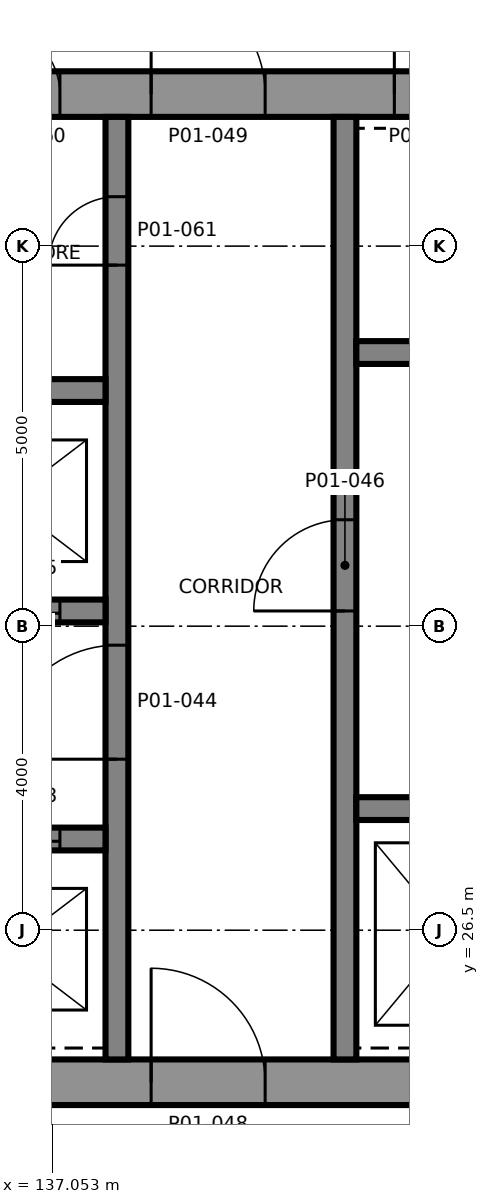
"""IFC4 building model, lengths in metres.
Left out: names, types, materials, properties, quantities, classifications, styles, units other than length and angle.
Written with IfcOpenShell. Run it as: python <this file> out.ifc"""

import sys

from ifc_helpers import new_model, si_unit, direction, frame, frame_2d, origin, place, context, subcontext, project, spatial, rectangle, extrude, element, fill, save


model = new_model("IFC4")
c1 = context("Model", 3, precision=1e-05, world=origin(), true_north=direction((0.0, 1.0)))
c2 = subcontext(c1, "Body", "Model", "MODEL_VIEW")
j1 = project(units=[si_unit("LENGTHUNIT", "METRE"), si_unit("PLANEANGLEUNIT", "RADIAN")], contexts=[c1])
p1 = place(None, origin())
s1 = spatial("IfcSite", under=j1, at=p1, CompositionType="ELEMENT")
p2 = place(p1, origin())
s2 = spatial("IfcBuilding", under=s1, at=p2, CompositionType="ELEMENT")
p3 = place(p2, frame((0.0, 0.0, 8.0)))
s3 = spatial("IfcBuildingStorey", under=s2, at=p3, CompositionType="ELEMENT", Elevation=8.0)
p4 = place(p3, frame((128.7, 24.5, 0.0), z_axis=(0.0, 0.0, 1.0), x_axis=(1.0, 0.0, 0.0)))
e1 = element("IfcWall", 1, at=p4, inside=s3, PredefinedType="SHEAR", context=c2, shape_type="SweptSolid", body=[
    extrude(rectangle(XDim=15.0, YDim=0.6, at=frame_2d((7.5, 0.0))), origin(), (0.0, 0.0, 1.0), 5.5),
])
p5 = place(p4, frame((9.65, 0.0, 0.0)))
e2 = element("IfcOpeningElement", 2, at=p5, cuts=e1, PredefinedType="OPENING", context=c2, shape_type="SweptSolid", body=[
    extrude(rectangle(XDim=1.5, YDim=2.1, at=frame_2d((0.75, 1.05))), frame((0.0, 0.31, 0.0), z_axis=(0.0, -1.0, 0.0), x_axis=(1.0, 0.0, 0.0)), (0.0, 0.0, 1.0), 0.62),
])
p6 = place(p4, frame((1.25, 0.0, 0.0)))
e3 = element("IfcOpeningElement", 3, at=p6, cuts=e1, PredefinedType="OPENING", context=c2, shape_type="SweptSolid", body=[
    extrude(rectangle(XDim=0.9, YDim=2.1, at=frame_2d((0.45, 1.05))), frame((0.0, 0.31, 0.0), z_axis=(0.0, -1.0, 0.0), x_axis=(1.0, 0.0, 0.0)), (0.0, 0.0, 1.0), 0.62),
])
p7 = place(p3, frame((128.7, 37.5, 0.0), z_axis=(0.0, 0.0, 1.0), x_axis=(1.0, 0.0, 0.0)))
e4 = element("IfcWall", 4, at=p7, inside=s3, PredefinedType="SHEAR", context=c2, shape_type="SweptSolid", body=[
    extrude(rectangle(XDim=15.0, YDim=0.6, at=frame_2d((7.5, 0.0))), origin(), (0.0, 0.0, 1.0), 5.5),
])
p8 = place(p7, frame((9.65, 0.0, 0.0)))
e5 = element("IfcOpeningElement", 5, at=p8, cuts=e4, PredefinedType="OPENING", context=c2, shape_type="SweptSolid", body=[
    extrude(rectangle(XDim=1.5, YDim=2.1, at=frame_2d((0.75, 1.05))), frame((0.0, 0.31, 0.0), z_axis=(0.0, -1.0, 0.0), x_axis=(1.0, 0.0, 0.0)), (0.0, 0.0, 1.0), 0.62),
])
p9 = place(p7, frame((12.85, 0.0, 0.0)))
e6 = element("IfcOpeningElement", 6, at=p9, cuts=e4, PredefinedType="OPENING", context=c2, shape_type="SweptSolid", body=[
    extrude(rectangle(XDim=0.9, YDim=2.1, at=frame_2d((0.45, 1.05))), frame((0.0, 0.31, 0.0), z_axis=(0.0, -1.0, 0.0), x_axis=(1.0, 0.0, 0.0)), (0.0, 0.0, 1.0), 0.62),
])
p10 = place(p7, frame((3.8, 0.0, 0.0)))
e7 = element("IfcOpeningElement", 7, at=p10, cuts=e4, PredefinedType="OPENING", context=c2, shape_type="SweptSolid", body=[
    extrude(rectangle(XDim=0.9, YDim=2.1, at=frame_2d((0.45, 1.05))), frame((0.0, 0.31, 0.0), z_axis=(0.0, -1.0, 0.0), x_axis=(1.0, 0.0, 0.0)), (0.0, 0.0, 1.0), 0.62),
])
p11 = place(p7, frame((5.8, 0.0, 0.0)))
e8 = element("IfcOpeningElement", 8, at=p11, cuts=e4, PredefinedType="OPENING", context=c2, shape_type="SweptSolid", body=[
    extrude(rectangle(XDim=0.9, YDim=2.1, at=frame_2d((0.45, 1.05))), frame((0.0, 0.31, 0.0), z_axis=(0.0, -1.0, 0.0), x_axis=(1.0, 0.0, 0.0)), (0.0, 0.0, 1.0), 0.62),
])
p12 = place(p7, frame((7.55, 0.0, 0.0)))
e9 = element("IfcOpeningElement", 9, at=p12, cuts=e4, PredefinedType="OPENING", context=c2, shape_type="SweptSolid", body=[
    extrude(rectangle(XDim=0.9, YDim=2.1, at=frame_2d((0.45, 1.05))), frame((0.0, 0.31, 0.0), z_axis=(0.0, -1.0, 0.0), x_axis=(1.0, 0.0, 0.0)), (0.0, 0.0, 1.0), 0.62),
])
p13 = place(p3, frame((137.9, 24.8, 0.0), z_axis=(0.0, 0.0, 1.0), x_axis=(0.0, 1.0, 0.0)))
e10 = element("IfcWall", 10, at=p13, inside=s3, PredefinedType="SHEAR", context=c2, shape_type="SweptSolid", body=[
    extrude(rectangle(XDim=12.4, YDim=0.3, at=frame_2d((6.2, 0.0))), origin(), (0.0, 0.0, 1.0), 5.5),
])
p14 = place(p13, frame((3.95, 0.0, 0.0)))
e11 = element("IfcOpeningElement", 11, at=p14, cuts=e10, PredefinedType="OPENING", context=c2, shape_type="SweptSolid", body=[
    extrude(rectangle(XDim=1.5, YDim=2.1, at=frame_2d((0.75, 1.05))), frame((0.0, 0.16, 0.0), z_axis=(0.0, -1.0, 0.0), x_axis=(1.0, 0.0, 0.0)), (0.0, 0.0, 1.0), 0.32),
])
p15 = place(p13, frame((10.45, 0.0, 0.0)))
e12 = element("IfcOpeningElement", 12, at=p15, cuts=e10, PredefinedType="OPENING", context=c2, shape_type="SweptSolid", body=[
    extrude(rectangle(XDim=0.9, YDim=2.1, at=frame_2d((0.45, 1.05))), frame((0.0, 0.16, 0.0), z_axis=(0.0, -1.0, 0.0), x_axis=(1.0, 0.0, 0.0)), (0.0, 0.0, 1.0), 0.32),
])
p16 = place(p3, frame((140.9, 24.8, 0.0), z_axis=(0.0, 0.0, 1.0), x_axis=(0.0, 1.0, 0.0)))
e13 = element("IfcWall", 13, at=p16, inside=s3, PredefinedType="SHEAR", context=c2, shape_type="SweptSolid", body=[
    extrude(rectangle(XDim=12.4, YDim=0.3, at=frame_2d((6.2, 0.0))), origin(), (0.0, 0.0, 1.0), 5.5),
])
p17 = place(p16, frame((5.9, 0.0, 0.0)))
e14 = element("IfcOpeningElement", 14, at=p17, cuts=e13, PredefinedType="OPENING", context=c2, shape_type="SweptSolid", body=[
    extrude(rectangle(XDim=1.2, YDim=2.1, at=frame_2d((0.6, 1.05))), frame((0.0, 0.16, 0.0), z_axis=(0.0, -1.0, 0.0), x_axis=(1.0, 0.0, 0.0)), (0.0, 0.0, 1.0), 0.32),
])
p18 = place(p3, frame((132.25, 27.7, 0.0), z_axis=(0.0, 0.0, 1.0), x_axis=(1.0, 0.0, 0.0)))
e15 = element("IfcWall", 15, at=p18, inside=s3, PredefinedType="SHEAR", context=c2, shape_type="SweptSolid", body=[
    extrude(rectangle(XDim=5.5, YDim=0.3, at=frame_2d((2.75, 0.0))), origin(), (0.0, 0.0, 1.0), 5.5),
])
p19 = place(p18, frame((0.9, 0.0, 0.0)))
e16 = element("IfcOpeningElement", 16, at=p19, cuts=e15, PredefinedType="OPENING", context=c2, shape_type="SweptSolid", body=[
    extrude(rectangle(XDim=1.1, YDim=2.4, at=frame_2d((0.55, 1.2))), frame((0.0, 0.16, 0.0), z_axis=(0.0, -1.0, 0.0), x_axis=(1.0, 0.0, 0.0)), (0.0, 0.0, 1.0), 0.32),
])
p20 = place(p18, frame((3.8, 0.0, 0.0)))
e17 = element("IfcOpeningElement", 17, at=p20, cuts=e15, PredefinedType="OPENING", context=c2, shape_type="SweptSolid", body=[
    extrude(rectangle(XDim=1.1, YDim=2.4, at=frame_2d((0.55, 1.2))), frame((0.0, 0.16, 0.0), z_axis=(0.0, -1.0, 0.0), x_axis=(1.0, 0.0, 0.0)), (0.0, 0.0, 1.0), 0.32),
])
p21 = place(p3, frame((132.25, 30.7, 0.0), z_axis=(0.0, 0.0, 1.0), x_axis=(1.0, 0.0, 0.0)))
e18 = element("IfcWall", 18, at=p21, inside=s3, PredefinedType="SHEAR", context=c2, shape_type="SweptSolid", body=[
    extrude(rectangle(XDim=5.5, YDim=0.3, at=frame_2d((2.75, 0.0))), origin(), (0.0, 0.0, 1.0), 5.5),
])
p22 = place(p21, frame((0.9, 0.0, 0.0)))
e19 = element("IfcOpeningElement", 19, at=p22, cuts=e18, PredefinedType="OPENING", context=c2, shape_type="SweptSolid", body=[
    extrude(rectangle(XDim=1.1, YDim=2.4, at=frame_2d((0.55, 1.2))), frame((0.0, 0.16, 0.0), z_axis=(0.0, -1.0, 0.0), x_axis=(1.0, 0.0, 0.0)), (0.0, 0.0, 1.0), 0.32),
])
p23 = place(p21, frame((3.8, 0.0, 0.0)))
e20 = element("IfcOpeningElement", 20, at=p23, cuts=e18, PredefinedType="OPENING", context=c2, shape_type="SweptSolid", body=[
    extrude(rectangle(XDim=1.1, YDim=2.4, at=frame_2d((0.55, 1.2))), frame((0.0, 0.16, 0.0), z_axis=(0.0, -1.0, 0.0), x_axis=(1.0, 0.0, 0.0)), (0.0, 0.0, 1.0), 0.32),
])
p24 = place(p3, frame((132.25, 33.6, 0.0), z_axis=(0.0, 0.0, 1.0), x_axis=(1.0, 0.0, 0.0)))
e21 = element("IfcWall", 21, at=p24, inside=s3, PredefinedType="SHEAR", context=c2, shape_type="SweptSolid", body=[
    extrude(rectangle(XDim=5.5, YDim=0.3, at=frame_2d((2.75, 0.0))), origin(), (0.0, 0.0, 1.0), 5.5),
])
p25 = place(p3, frame((141.05, 28.1, 0.0), z_axis=(0.0, 0.0, 1.0), x_axis=(1.0, 0.0, 0.0)))
e22 = element("IfcWall", 22, at=p25, inside=s3, PredefinedType="SHEAR", context=c2, shape_type="SweptSolid", body=[
    extrude(rectangle(XDim=2.65, YDim=0.3, at=frame_2d((1.325, 0.0))), origin(), (0.0, 0.0, 1.0), 5.5),
])
p26 = place(p25, frame((0.75, 0.0, 0.0)))
e23 = element("IfcOpeningElement", 23, at=p26, cuts=e22, PredefinedType="OPENING", context=c2, shape_type="SweptSolid", body=[
    extrude(rectangle(XDim=1.3, YDim=2.4, at=frame_2d((0.65, 1.2))), frame((0.0, 0.16, 0.0), z_axis=(0.0, -1.0, 0.0), x_axis=(1.0, 0.0, 0.0)), (0.0, 0.0, 1.0), 0.32),
])
p27 = place(p3, frame((141.05, 34.1, 0.0), z_axis=(0.0, 0.0, 1.0), x_axis=(1.0, 0.0, 0.0)))
e24 = element("IfcWall", 24, at=p27, inside=s3, PredefinedType="SHEAR", context=c2, shape_type="SweptSolid", body=[
    extrude(rectangle(XDim=2.65, YDim=0.3, at=frame_2d((1.325, 0.0))), origin(), (0.0, 0.0, 1.0), 5.5),
])
p28 = place(p14, origin())
e25 = element("IfcDoor", 25, at=p28, inside=s3, OperationType="SINGLE_SWING_RIGHT", PredefinedType="DOOR", context=c2, shape_type="SweptSolid", body=[
    extrude(rectangle(XDim=1.5, YDim=2.1, at=frame_2d((0.75, 1.05))), frame((0.0, 0.025, 0.0), z_axis=(0.0, -1.0, 0.0), x_axis=(1.0, 0.0, 0.0)), (0.0, 0.0, 1.0), 0.05),
])
fill(e11, e25)
p29 = place(p17, origin())
e26 = element("IfcDoor", 26, at=p29, inside=s3, OperationType="SINGLE_SWING_RIGHT", PredefinedType="DOOR", context=c2, shape_type="SweptSolid", body=[
    extrude(rectangle(XDim=1.2, YDim=2.1, at=frame_2d((0.6, 1.05))), frame((0.0, 0.025, 0.0), z_axis=(0.0, -1.0, 0.0), x_axis=(1.0, 0.0, 0.0)), (0.0, 0.0, 1.0), 0.05),
])
fill(e14, e26)
p30 = place(p5, origin())
e27 = element("IfcDoor", 27, at=p30, inside=s3, OperationType="SINGLE_SWING_LEFT", PredefinedType="DOOR", context=c2, shape_type="SweptSolid", body=[
    extrude(rectangle(XDim=1.5, YDim=2.1, at=frame_2d((0.75, 1.05))), frame((0.0, 0.025, 0.0), z_axis=(0.0, -1.0, 0.0), x_axis=(1.0, 0.0, 0.0)), (0.0, 0.0, 1.0), 0.05),
])
fill(e2, e27)
p31 = place(p8, origin())
e28 = element("IfcDoor", 28, at=p31, inside=s3, OperationType="SINGLE_SWING_RIGHT", PredefinedType="DOOR", context=c2, shape_type="SweptSolid", body=[
    extrude(rectangle(XDim=1.5, YDim=2.1, at=frame_2d((0.75, 1.05))), frame((0.0, 0.025, 0.0), z_axis=(0.0, -1.0, 0.0), x_axis=(1.0, 0.0, 0.0)), (0.0, 0.0, 1.0), 0.05),
])
fill(e5, e28)
p32 = place(p9, origin())
e29 = element("IfcDoor", 29, at=p32, inside=s3, OperationType="SINGLE_SWING_RIGHT", PredefinedType="DOOR", context=c2, shape_type="SweptSolid", body=[
    extrude(rectangle(XDim=0.9, YDim=2.1, at=frame_2d((0.45, 1.05))), frame((0.0, 0.025, 0.0), z_axis=(0.0, -1.0, 0.0), x_axis=(1.0, 0.0, 0.0)), (0.0, 0.0, 1.0), 0.05),
])
fill(e6, e29)
p33 = place(p20, origin())
e30 = element("IfcDoor", 30, at=p33, inside=s3, OperationType="SLIDING_TO_LEFT", PredefinedType="DOOR", context=c2, shape_type="SweptSolid", body=[
    extrude(rectangle(XDim=1.1, YDim=2.4, at=frame_2d((0.55, 1.2))), frame((0.0, 0.025, 0.0), z_axis=(0.0, -1.0, 0.0), x_axis=(1.0, 0.0, 0.0)), (0.0, 0.0, 1.0), 0.05),
])
fill(e17, e30)
p34 = place(p23, origin())
e31 = element("IfcDoor", 31, at=p34, inside=s3, OperationType="SLIDING_TO_LEFT", PredefinedType="DOOR", context=c2, shape_type="SweptSolid", body=[
    extrude(rectangle(XDim=1.1, YDim=2.4, at=frame_2d((0.55, 1.2))), frame((0.0, 0.025, 0.0), z_axis=(0.0, -1.0, 0.0), x_axis=(1.0, 0.0, 0.0)), (0.0, 0.0, 1.0), 0.05),
])
fill(e20, e31)
p35 = place(p12, origin())
e32 = element("IfcDoor", 32, at=p35, inside=s3, OperationType="SINGLE_SWING_LEFT", PredefinedType="DOOR", context=c2, shape_type="SweptSolid", body=[
    extrude(rectangle(XDim=0.9, YDim=2.1, at=frame_2d((0.45, 1.05))), frame((0.0, 0.025, 0.0), z_axis=(0.0, -1.0, 0.0), x_axis=(1.0, 0.0, 0.0)), (0.0, 0.0, 1.0), 0.05),
])
fill(e9, e32)
p36 = place(p15, origin())
e33 = element("IfcDoor", 33, at=p36, inside=s3, OperationType="SINGLE_SWING_RIGHT", PredefinedType="DOOR", context=c2, shape_type="SweptSolid", body=[
    extrude(rectangle(XDim=0.9, YDim=2.1, at=frame_2d((0.45, 1.05))), frame((0.0, 0.025, 0.0), z_axis=(0.0, -1.0, 0.0), x_axis=(1.0, 0.0, 0.0)), (0.0, 0.0, 1.0), 0.05),
])
fill(e12, e33)
save(model, sys.argv[1])
